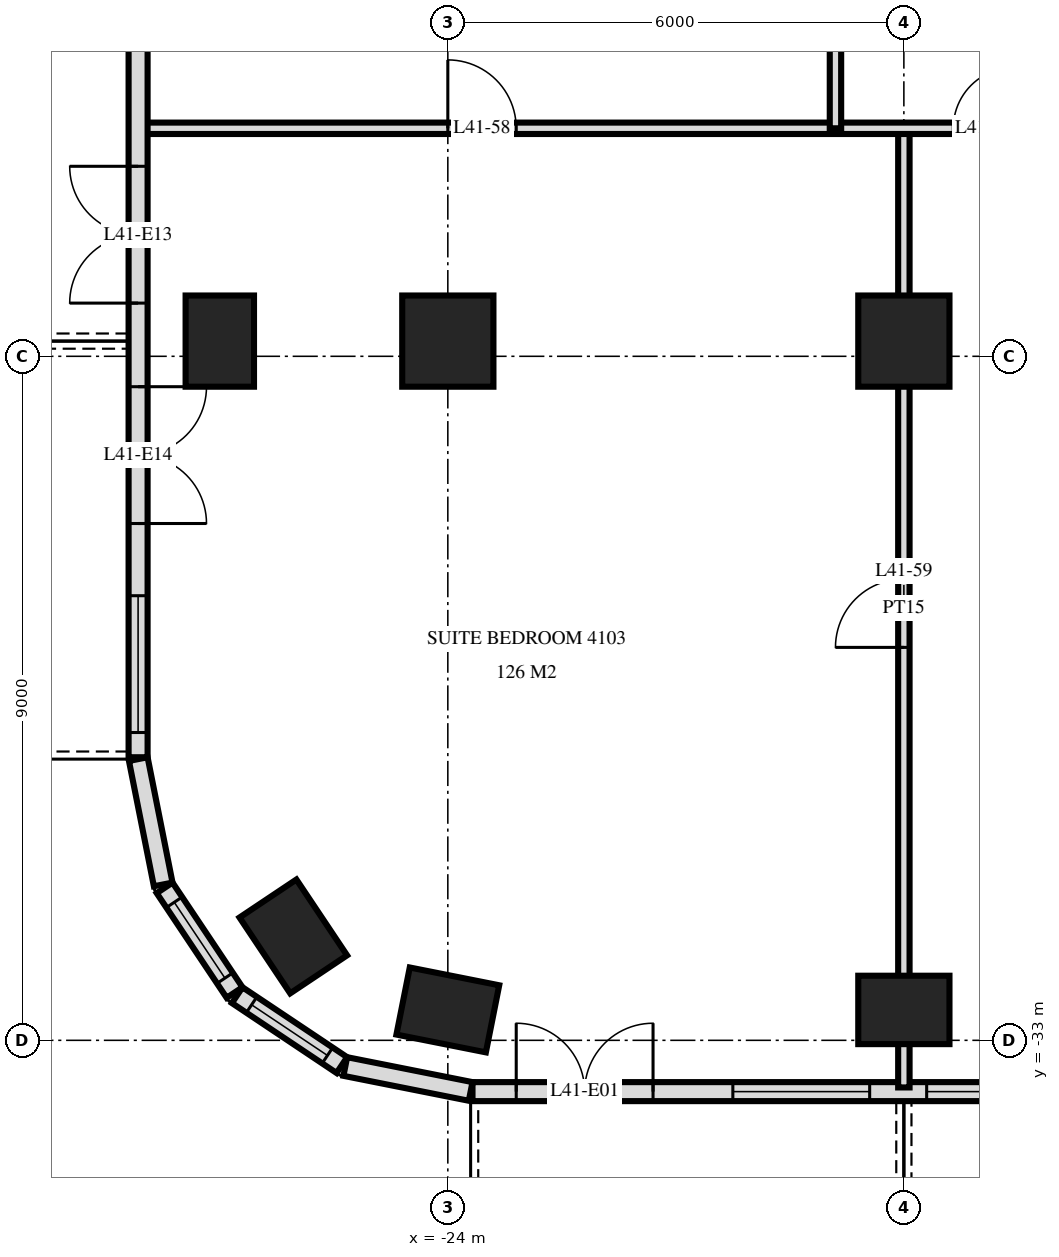
"""IFC4 building model, lengths in metres.
Left out: names, types, materials, properties, quantities, classifications, styles, units other than length and angle.
Written with IfcOpenShell. Run it as: python <this file> out.ifc"""

import sys

from ifc_helpers import new_model, si_unit, direction, frame, frame_2d, origin, origin_2d, place, context, subcontext, project, spatial, rectangle, extrude, element, fill, save


model = new_model("IFC4")
c1 = context("Model", 3, precision=1e-05, world=origin(), true_north=direction((0.0, 1.0)))
c2 = subcontext(c1, "Body", "Model", "MODEL_VIEW")
j1 = project(units=[si_unit("LENGTHUNIT", "METRE"), si_unit("PLANEANGLEUNIT", "RADIAN")], contexts=[c1])
p1 = place(None, origin())
s1 = spatial("IfcSite", under=j1, at=p1, CompositionType="ELEMENT")
p2 = place(p1, origin())
s2 = spatial("IfcBuilding", under=s1, at=p2, CompositionType="ELEMENT")
p3 = place(p2, frame((0.0, 0.0, 159.6)))
s3 = spatial("IfcBuildingStorey", under=s2, at=p3, CompositionType="ELEMENT", Elevation=159.6)
for number, where, z_axis, x_axis in (
    (1, (-27.0, -23.8, 0.0), (0.0, 0.0, 1.0), (0.0, 1.0, 0.0)),
    (2, (-26.033, -31.633, 0.0), (0.0, 0.0, 1.0), (-0.556, 0.831, 0.0)),
    (3, (-24.0, -32.6, 0.0), (0.0, 0.0, 1.0), (-0.981, 0.195, 0.0)),
):
    element("IfcColumn", number, at=place(p3, frame(where, z_axis=z_axis, x_axis=x_axis)), inside=s3, PredefinedType="COLUMN", context=c2, shape_type="SweptSolid", body=[
        extrude(rectangle(XDim=1.2, YDim=0.9, at=origin_2d()), origin(), (0.0, 0.0, 1.0), 3.6),
    ])
p4 = place(p3, frame((-24.0, -23.8, 0.0), z_axis=(0.0, 0.0, 1.0), x_axis=(1.0, 0.0, 0.0)))
e4 = element("IfcColumn", 4, at=p4, inside=s3, PredefinedType="COLUMN", context=c2, shape_type="SweptSolid", body=[
    extrude(rectangle(XDim=1.2, YDim=1.2, at=origin_2d()), origin(), (0.0, 0.0, 1.0), 3.6),
])
p5 = place(p3, frame((-18.0, -32.6, 0.0), z_axis=(0.0, 0.0, 1.0), x_axis=(1.0, 0.0, 0.0)))
e5 = element("IfcColumn", 5, at=p5, inside=s3, PredefinedType="COLUMN", context=c2, shape_type="SweptSolid", body=[
    extrude(rectangle(XDim=1.2, YDim=0.9, at=origin_2d()), origin(), (0.0, 0.0, 1.0), 3.6),
])
p6 = place(p3, frame((-18.0, -23.8, 0.0), z_axis=(0.0, 0.0, 1.0), x_axis=(1.0, 0.0, 0.0)))
e6 = element("IfcColumn", 6, at=p6, inside=s3, PredefinedType="COLUMN", context=c2, shape_type="SweptSolid", body=[
    extrude(rectangle(XDim=1.2, YDim=1.2, at=origin_2d()), origin(), (0.0, 0.0, 1.0), 3.6),
])
p7 = place(p3, frame((-28.075, -3.325, 0.0), z_axis=(0.0, 0.0, 1.0), x_axis=(0.0, -1.0, 0.0)))
e7 = element("IfcWall", 7, at=p7, inside=s3, PredefinedType="SOLIDWALL", context=c2, shape_type="SweptSolid", body=[
    extrude(rectangle(XDim=25.951, YDim=0.25, at=frame_2d((12.975, 0.0))), origin(), (0.0, 0.0, 1.0), 3.32),
])
p8 = place(p7, frame((6.65, 0.0, 0.0)))
e8 = element("IfcOpeningElement", 8, at=p8, cuts=e7, PredefinedType="OPENING", context=c2, shape_type="SweptSolid", body=[
    extrude(rectangle(XDim=1.8, YDim=2.4, at=frame_2d((0.9, 1.2))), frame((0.0, 0.135, 0.0), z_axis=(0.0, -1.0, 0.0), x_axis=(1.0, 0.0, 0.0)), (0.0, 0.0, 1.0), 0.27),
])
p9 = place(p7, frame((12.575, 0.0, 0.3)))
e9 = element("IfcOpeningElement", 9, at=p9, cuts=e7, PredefinedType="OPENING", context=c2, shape_type="SweptSolid", body=[
    extrude(rectangle(XDim=1.2, YDim=2.1, at=frame_2d((0.6, 1.05))), frame((0.0, 0.135, 0.0), z_axis=(0.0, -1.0, 0.0), x_axis=(1.0, 0.0, 0.0)), (0.0, 0.0, 1.0), 0.27),
])
p10 = place(p7, frame((18.175, 0.0, 0.0)))
e10 = element("IfcOpeningElement", 10, at=p10, cuts=e7, PredefinedType="OPENING", context=c2, shape_type="SweptSolid", body=[
    extrude(rectangle(XDim=1.8, YDim=2.4, at=frame_2d((0.9, 1.2))), frame((0.0, 0.135, 0.0), z_axis=(0.0, -1.0, 0.0), x_axis=(1.0, 0.0, 0.0)), (0.0, 0.0, 1.0), 0.27),
])
p11 = place(p7, frame((21.075, 0.0, 0.0)))
e11 = element("IfcOpeningElement", 11, at=p11, cuts=e7, PredefinedType="OPENING", context=c2, shape_type="SweptSolid", body=[
    extrude(rectangle(XDim=1.8, YDim=2.4, at=frame_2d((0.9, 1.2))), frame((0.0, 0.135, 0.0), z_axis=(0.0, -1.0, 0.0), x_axis=(1.0, 0.0, 0.0)), (0.0, 0.0, 1.0), 0.27),
])
p12 = place(p7, frame((23.825, 0.0, 0.3)))
e12 = element("IfcOpeningElement", 12, at=p12, cuts=e7, PredefinedType="OPENING", context=c2, shape_type="SweptSolid", body=[
    extrude(rectangle(XDim=1.8, YDim=2.1, at=frame_2d((0.9, 1.05))), frame((0.0, 0.135, 0.0), z_axis=(0.0, -1.0, 0.0), x_axis=(1.0, 0.0, 0.0)), (0.0, 0.0, 1.0), 0.27),
])
p13 = place(p3, frame((-28.073, -29.3, 0.0), z_axis=(0.0, 0.0, 1.0), x_axis=(0.194999110559, -0.980803419081, 0.0)))
e13 = element("IfcWall", 13, at=p13, inside=s3, PredefinedType="SOLIDWALL", context=c2, shape_type="SweptSolid", body=[
    extrude(rectangle(XDim=1.681, YDim=0.25, at=frame_2d((0.841, 0.0))), origin(), (0.0, 0.0, 1.0), 3.32),
])
p14 = place(p3, frame((-27.726, -30.994, 0.0), z_axis=(0.0, 0.0, 1.0), x_axis=(0.55555029066, -0.831482937015, 0.0)))
e14 = element("IfcWall", 14, at=p14, inside=s3, PredefinedType="SOLIDWALL", context=c2, shape_type="SweptSolid", body=[
    extrude(rectangle(XDim=1.656, YDim=0.25, at=frame_2d((0.828, 0.0))), origin(), (0.0, 0.0, 1.0), 3.32),
])
p15 = place(p14, frame((0.228, 0.0, 0.9)))
e15 = element("IfcOpeningElement", 15, at=p15, cuts=e14, PredefinedType="OPENING", context=c2, shape_type="SweptSolid", body=[
    extrude(rectangle(XDim=1.2, YDim=1.5, at=frame_2d((0.6, 0.75))), frame((0.0, 0.135, 0.0), z_axis=(0.0, -1.0, 0.0), x_axis=(1.0, 0.0, 0.0)), (0.0, 0.0, 1.0), 0.27),
])
p16 = place(p3, frame((-26.771, -32.406, 0.0), z_axis=(0.0, 0.0, 1.0), x_axis=(0.831482937015, -0.55555029066, 0.0)))
e16 = element("IfcWall", 16, at=p16, inside=s3, PredefinedType="SOLIDWALL", context=c2, shape_type="SweptSolid", body=[
    extrude(rectangle(XDim=1.656, YDim=0.25, at=frame_2d((0.828, 0.0))), origin(), (0.0, 0.0, 1.0), 3.32),
])
p17 = place(p16, frame((0.228, 0.0, 0.9)))
e17 = element("IfcOpeningElement", 17, at=p17, cuts=e16, PredefinedType="OPENING", context=c2, shape_type="SweptSolid", body=[
    extrude(rectangle(XDim=1.2, YDim=1.5, at=frame_2d((0.6, 0.75))), frame((0.0, 0.135, 0.0), z_axis=(0.0, -1.0, 0.0), x_axis=(1.0, 0.0, 0.0)), (0.0, 0.0, 1.0), 0.27),
])
p18 = place(p3, frame((-25.349, -33.344, 0.0), z_axis=(0.0, 0.0, 1.0), x_axis=(0.980775640221, -0.19513878023, 0.0)))
e18 = element("IfcWall", 18, at=p18, inside=s3, PredefinedType="SOLIDWALL", context=c2, shape_type="SweptSolid", body=[
    extrude(rectangle(XDim=1.681, YDim=0.25, at=frame_2d((0.841, 0.0))), origin(), (0.0, 0.0, 1.0), 3.32),
])
p19 = place(p3, frame((-23.675, -33.675, 0.0), z_axis=(0.0, 0.0, 1.0), x_axis=(1.0, 0.0, 0.0)))
e19 = element("IfcWall", 19, at=p19, inside=s3, PredefinedType="SOLIDWALL", context=c2, shape_type="SweptSolid", body=[
    extrude(rectangle(XDim=47.351, YDim=0.25, at=frame_2d((23.675, 0.0))), origin(), (0.0, 0.0, 1.0), 3.32),
])
p20 = place(p19, frame((0.575, 0.0, 0.0)))
e20 = element("IfcOpeningElement", 20, at=p20, cuts=e19, PredefinedType="OPENING", context=c2, shape_type="SweptSolid", body=[
    extrude(rectangle(XDim=1.8, YDim=2.4, at=frame_2d((0.9, 1.2))), frame((0.0, 0.135, 0.0), z_axis=(0.0, -1.0, 0.0), x_axis=(1.0, 0.0, 0.0)), (0.0, 0.0, 1.0), 0.27),
])
p21 = place(p19, frame((3.425, 0.0, 0.3)))
e21 = element("IfcOpeningElement", 21, at=p21, cuts=e19, PredefinedType="OPENING", context=c2, shape_type="SweptSolid", body=[
    extrude(rectangle(XDim=1.8, YDim=2.1, at=frame_2d((0.9, 1.05))), frame((0.0, 0.135, 0.0), z_axis=(0.0, -1.0, 0.0), x_axis=(1.0, 0.0, 0.0)), (0.0, 0.0, 1.0), 0.27),
])
p22 = place(p19, frame((5.975, 0.0, 0.3)))
e22 = element("IfcOpeningElement", 22, at=p22, cuts=e19, PredefinedType="OPENING", context=c2, shape_type="SweptSolid", body=[
    extrude(rectangle(XDim=2.4, YDim=2.1, at=frame_2d((1.2, 1.05))), frame((0.0, 0.135, 0.0), z_axis=(0.0, -1.0, 0.0), x_axis=(1.0, 0.0, 0.0)), (0.0, 0.0, 1.0), 0.27),
])
p23 = place(p19, frame((9.275, 0.0, 0.0)))
e23 = element("IfcOpeningElement", 23, at=p23, cuts=e19, PredefinedType="OPENING", context=c2, shape_type="SweptSolid", body=[
    extrude(rectangle(XDim=1.8, YDim=2.4, at=frame_2d((0.9, 1.2))), frame((0.0, 0.135, 0.0), z_axis=(0.0, -1.0, 0.0), x_axis=(1.0, 0.0, 0.0)), (0.0, 0.0, 1.0), 0.27),
])
p24 = place(p19, frame((12.275, 0.0, 0.0)))
e24 = element("IfcOpeningElement", 24, at=p24, cuts=e19, PredefinedType="OPENING", context=c2, shape_type="SweptSolid", body=[
    extrude(rectangle(XDim=1.8, YDim=2.4, at=frame_2d((0.9, 1.2))), frame((0.0, 0.135, 0.0), z_axis=(0.0, -1.0, 0.0), x_axis=(1.0, 0.0, 0.0)), (0.0, 0.0, 1.0), 0.27),
])
p25 = place(p19, frame((14.975, 0.0, 0.3)))
e25 = element("IfcOpeningElement", 25, at=p25, cuts=e19, PredefinedType="OPENING", context=c2, shape_type="SweptSolid", body=[
    extrude(rectangle(XDim=2.4, YDim=2.1, at=frame_2d((1.2, 1.05))), frame((0.0, 0.135, 0.0), z_axis=(0.0, -1.0, 0.0), x_axis=(1.0, 0.0, 0.0)), (0.0, 0.0, 1.0), 0.27),
])
p26 = place(p19, frame((17.975, 0.0, 0.3)))
e26 = element("IfcOpeningElement", 26, at=p26, cuts=e19, PredefinedType="OPENING", context=c2, shape_type="SweptSolid", body=[
    extrude(rectangle(XDim=2.4, YDim=2.1, at=frame_2d((1.2, 1.05))), frame((0.0, 0.135, 0.0), z_axis=(0.0, -1.0, 0.0), x_axis=(1.0, 0.0, 0.0)), (0.0, 0.0, 1.0), 0.27),
])
p27 = place(p19, frame((21.275, 0.0, 0.0)))
e27 = element("IfcOpeningElement", 27, at=p27, cuts=e19, PredefinedType="OPENING", context=c2, shape_type="SweptSolid", body=[
    extrude(rectangle(XDim=1.8, YDim=2.4, at=frame_2d((0.9, 1.2))), frame((0.0, 0.135, 0.0), z_axis=(0.0, -1.0, 0.0), x_axis=(1.0, 0.0, 0.0)), (0.0, 0.0, 1.0), 0.27),
])
p28 = place(p19, frame((24.275, 0.0, 0.0)))
e28 = element("IfcOpeningElement", 28, at=p28, cuts=e19, PredefinedType="OPENING", context=c2, shape_type="SweptSolid", body=[
    extrude(rectangle(XDim=1.8, YDim=2.4, at=frame_2d((0.9, 1.2))), frame((0.0, 0.135, 0.0), z_axis=(0.0, -1.0, 0.0), x_axis=(1.0, 0.0, 0.0)), (0.0, 0.0, 1.0), 0.27),
])
p29 = place(p19, frame((26.975, 0.0, 0.3)))
e29 = element("IfcOpeningElement", 29, at=p29, cuts=e19, PredefinedType="OPENING", context=c2, shape_type="SweptSolid", body=[
    extrude(rectangle(XDim=2.4, YDim=2.1, at=frame_2d((1.2, 1.05))), frame((0.0, 0.135, 0.0), z_axis=(0.0, -1.0, 0.0), x_axis=(1.0, 0.0, 0.0)), (0.0, 0.0, 1.0), 0.27),
])
p30 = place(p19, frame((30.275, 0.0, 0.0)))
e30 = element("IfcOpeningElement", 30, at=p30, cuts=e19, PredefinedType="OPENING", context=c2, shape_type="SweptSolid", body=[
    extrude(rectangle(XDim=1.8, YDim=2.4, at=frame_2d((0.9, 1.2))), frame((0.0, 0.135, 0.0), z_axis=(0.0, -1.0, 0.0), x_axis=(1.0, 0.0, 0.0)), (0.0, 0.0, 1.0), 0.27),
])
p31 = place(p19, frame((32.975, 0.0, 0.3)))
e31 = element("IfcOpeningElement", 31, at=p31, cuts=e19, PredefinedType="OPENING", context=c2, shape_type="SweptSolid", body=[
    extrude(rectangle(XDim=2.4, YDim=2.1, at=frame_2d((1.2, 1.05))), frame((0.0, 0.135, 0.0), z_axis=(0.0, -1.0, 0.0), x_axis=(1.0, 0.0, 0.0)), (0.0, 0.0, 1.0), 0.27),
])
p32 = place(p19, frame((36.275, 0.0, 0.0)))
e32 = element("IfcOpeningElement", 32, at=p32, cuts=e19, PredefinedType="OPENING", context=c2, shape_type="SweptSolid", body=[
    extrude(rectangle(XDim=1.8, YDim=2.4, at=frame_2d((0.9, 1.2))), frame((0.0, 0.135, 0.0), z_axis=(0.0, -1.0, 0.0), x_axis=(1.0, 0.0, 0.0)), (0.0, 0.0, 1.0), 0.27),
])
p33 = place(p19, frame((38.975, 0.0, 0.3)))
e33 = element("IfcOpeningElement", 33, at=p33, cuts=e19, PredefinedType="OPENING", context=c2, shape_type="SweptSolid", body=[
    extrude(rectangle(XDim=2.4, YDim=2.1, at=frame_2d((1.2, 1.05))), frame((0.0, 0.135, 0.0), z_axis=(0.0, -1.0, 0.0), x_axis=(1.0, 0.0, 0.0)), (0.0, 0.0, 1.0), 0.27),
])
p34 = place(p19, frame((41.975, 0.0, 0.3)))
e34 = element("IfcOpeningElement", 34, at=p34, cuts=e19, PredefinedType="OPENING", context=c2, shape_type="SweptSolid", body=[
    extrude(rectangle(XDim=2.4, YDim=2.1, at=frame_2d((1.2, 1.05))), frame((0.0, 0.135, 0.0), z_axis=(0.0, -1.0, 0.0), x_axis=(1.0, 0.0, 0.0)), (0.0, 0.0, 1.0), 0.27),
])
p35 = place(p19, frame((45.125, 0.0, 0.0)))
e35 = element("IfcOpeningElement", 35, at=p35, cuts=e19, PredefinedType="OPENING", context=c2, shape_type="SweptSolid", body=[
    extrude(rectangle(XDim=1.8, YDim=2.4, at=frame_2d((0.9, 1.2))), frame((0.0, 0.135, 0.0), z_axis=(0.0, -1.0, 0.0), x_axis=(1.0, 0.0, 0.0)), (0.0, 0.0, 1.0), 0.27),
])
p36 = place(p3, frame((-18.0, -33.62, 0.0), z_axis=(0.0, 0.0, 1.0), x_axis=(0.0, 1.0, 0.0)))
e36 = element("IfcWall", 36, at=p36, inside=s3, PredefinedType="PARTITIONING", context=c2, shape_type="SweptSolid", body=[
    extrude(rectangle(XDim=12.62, YDim=0.15, at=frame_2d((6.31, 0.0))), origin(), (0.0, 0.0, 1.0), 3.32),
])
p37 = place(p36, frame((5.79, 0.0, 0.0)))
e37 = element("IfcOpeningElement", 37, at=p37, cuts=e36, PredefinedType="OPENING", context=c2, shape_type="SweptSolid", body=[
    extrude(rectangle(XDim=0.9, YDim=2.1, at=frame_2d((0.45, 1.05))), frame((0.0, 0.085, 0.0), z_axis=(0.0, -1.0, 0.0), x_axis=(1.0, 0.0, 0.0)), (0.0, 0.0, 1.0), 0.17),
])
p38 = place(p3, frame((-18.9, -21.0, 0.0), z_axis=(0.0, 0.0, 1.0), x_axis=(0.0, 1.0, 0.0)))
e38 = element("IfcWall", 38, at=p38, inside=s3, PredefinedType="PARTITIONING", context=c2, shape_type="SweptSolid", body=[
    extrude(rectangle(XDim=3.0, YDim=0.15, at=frame_2d((1.5, 0.0))), origin(), (0.0, 0.0, 1.0), 3.32),
])
p39 = place(p3, frame((-28.02, -21.0, 0.0), z_axis=(0.0, 0.0, 1.0), x_axis=(1.0, 0.0, 0.0)))
e39 = element("IfcWall", 39, at=p39, inside=s3, PredefinedType="PARTITIONING", context=c2, shape_type="SweptSolid", body=[
    extrude(rectangle(XDim=12.12, YDim=0.15, at=frame_2d((6.06, 0.0))), origin(), (0.0, 0.0, 1.0), 3.32),
])
p40 = place(p39, frame((10.67, 0.0, 0.0)))
e40 = element("IfcOpeningElement", 40, at=p40, cuts=e39, PredefinedType="OPENING", context=c2, shape_type="SweptSolid", body=[
    extrude(rectangle(XDim=0.8, YDim=2.1, at=frame_2d((0.4, 1.05))), frame((0.0, 0.085, 0.0), z_axis=(0.0, -1.0, 0.0), x_axis=(1.0, 0.0, 0.0)), (0.0, 0.0, 1.0), 0.17),
])
p41 = place(p39, frame((4.02, 0.0, 0.0)))
e41 = element("IfcOpeningElement", 41, at=p41, cuts=e39, PredefinedType="OPENING", context=c2, shape_type="SweptSolid", body=[
    extrude(rectangle(XDim=0.9, YDim=2.1, at=frame_2d((0.45, 1.05))), frame((0.0, 0.085, 0.0), z_axis=(0.0, -1.0, 0.0), x_axis=(1.0, 0.0, 0.0)), (0.0, 0.0, 1.0), 0.17),
])
p42 = place(p15, origin())
e42 = element("IfcWindow", 42, at=p42, inside=s3, PartitioningType="SINGLE_PANEL", PredefinedType="WINDOW", context=c2, shape_type="SweptSolid", body=[
    extrude(rectangle(XDim=1.2, YDim=1.5, at=frame_2d((0.6, 0.75))), frame((0.0, 0.03, 0.0), z_axis=(0.0, -1.0, 0.0), x_axis=(1.0, 0.0, 0.0)), (0.0, 0.0, 1.0), 0.06),
])
fill(e15, e42)
p43 = place(p17, origin())
e43 = element("IfcWindow", 43, at=p43, inside=s3, PartitioningType="SINGLE_PANEL", PredefinedType="WINDOW", context=c2, shape_type="SweptSolid", body=[
    extrude(rectangle(XDim=1.2, YDim=1.5, at=frame_2d((0.6, 0.75))), frame((0.0, 0.03, 0.0), z_axis=(0.0, -1.0, 0.0), x_axis=(1.0, 0.0, 0.0)), (0.0, 0.0, 1.0), 0.06),
])
fill(e17, e43)
p44 = place(p20, origin())
e44 = element("IfcDoor", 44, at=p44, inside=s3, OperationType="DOUBLE_DOOR_SINGLE_SWING", PredefinedType="DOOR", context=c2, shape_type="SweptSolid", body=[
    extrude(rectangle(XDim=1.8, YDim=2.4, at=frame_2d((0.9, 1.2))), frame((0.0, 0.025, 0.0), z_axis=(0.0, -1.0, 0.0), x_axis=(1.0, 0.0, 0.0)), (0.0, 0.0, 1.0), 0.05),
])
fill(e20, e44)
p45 = place(p21, origin())
e45 = element("IfcWindow", 45, at=p45, inside=s3, PartitioningType="SINGLE_PANEL", PredefinedType="WINDOW", context=c2, shape_type="SweptSolid", body=[
    extrude(rectangle(XDim=1.8, YDim=2.1, at=frame_2d((0.9, 1.05))), frame((0.0, 0.03, 0.0), z_axis=(0.0, -1.0, 0.0), x_axis=(1.0, 0.0, 0.0)), (0.0, 0.0, 1.0), 0.06),
])
fill(e21, e45)
p46 = place(p22, origin())
e46 = element("IfcWindow", 46, at=p46, inside=s3, PartitioningType="SINGLE_PANEL", PredefinedType="WINDOW", context=c2, shape_type="SweptSolid", body=[
    extrude(rectangle(XDim=2.4, YDim=2.1, at=frame_2d((1.2, 1.05))), frame((0.0, 0.03, 0.0), z_axis=(0.0, -1.0, 0.0), x_axis=(1.0, 0.0, 0.0)), (0.0, 0.0, 1.0), 0.06),
])
fill(e22, e46)
p47 = place(p10, frame((0.9, 0.0, 0.0), z_axis=(0.0, 0.0, 1.0), x_axis=(-1.0, 0.0, 0.0)))
e47 = element("IfcDoor", 47, at=p47, inside=s3, OperationType="DOUBLE_DOOR_SINGLE_SWING", PredefinedType="DOOR", context=c2, shape_type="SweptSolid", body=[
    extrude(rectangle(XDim=1.8, YDim=2.4, at=frame_2d((0.0, 1.2))), frame((0.0, -0.025, 0.0), z_axis=(0.0, 1.0, 0.0), x_axis=(-1.0, 0.0, 0.0)), (0.0, 0.0, 1.0), 0.05),
])
fill(e10, e47)
p48 = place(p11, origin())
e48 = element("IfcDoor", 48, at=p48, inside=s3, OperationType="DOUBLE_DOOR_SINGLE_SWING", PredefinedType="DOOR", context=c2, shape_type="SweptSolid", body=[
    extrude(rectangle(XDim=1.8, YDim=2.4, at=frame_2d((0.9, 1.2))), frame((0.0, 0.025, 0.0), z_axis=(0.0, -1.0, 0.0), x_axis=(1.0, 0.0, 0.0)), (0.0, 0.0, 1.0), 0.05),
])
fill(e11, e48)
p49 = place(p12, origin())
e49 = element("IfcWindow", 49, at=p49, inside=s3, PartitioningType="SINGLE_PANEL", PredefinedType="WINDOW", context=c2, shape_type="SweptSolid", body=[
    extrude(rectangle(XDim=1.8, YDim=2.1, at=frame_2d((0.9, 1.05))), frame((0.0, 0.03, 0.0), z_axis=(0.0, -1.0, 0.0), x_axis=(1.0, 0.0, 0.0)), (0.0, 0.0, 1.0), 0.06),
])
fill(e12, e49)
p50 = place(p40, origin())
e50 = element("IfcDoor", 50, at=p50, inside=s3, OperationType="SINGLE_SWING_LEFT", PredefinedType="DOOR", context=c2, shape_type="SweptSolid", body=[
    extrude(rectangle(XDim=0.8, YDim=2.1, at=frame_2d((0.4, 1.05))), frame((0.0, 0.025, 0.0), z_axis=(0.0, -1.0, 0.0), x_axis=(1.0, 0.0, 0.0)), (0.0, 0.0, 1.0), 0.05),
])
fill(e40, e50)
p51 = place(p41, origin())
e51 = element("IfcDoor", 51, at=p51, inside=s3, OperationType="SINGLE_SWING_RIGHT", PredefinedType="DOOR", context=c2, shape_type="SweptSolid", body=[
    extrude(rectangle(XDim=0.9, YDim=2.1, at=frame_2d((0.45, 1.05))), frame((0.0, 0.025, 0.0), z_axis=(0.0, -1.0, 0.0), x_axis=(1.0, 0.0, 0.0)), (0.0, 0.0, 1.0), 0.05),
])
fill(e41, e51)
p52 = place(p37, origin())
e52 = element("IfcDoor", 52, at=p52, inside=s3, OperationType="SINGLE_SWING_RIGHT", PredefinedType="DOOR", context=c2, shape_type="SweptSolid", body=[
    extrude(rectangle(XDim=0.9, YDim=2.1, at=frame_2d((0.45, 1.05))), frame((0.0, 0.025, 0.0), z_axis=(0.0, -1.0, 0.0), x_axis=(1.0, 0.0, 0.0)), (0.0, 0.0, 1.0), 0.05),
])
fill(e37, e52)
save(model, sys.argv[1])
